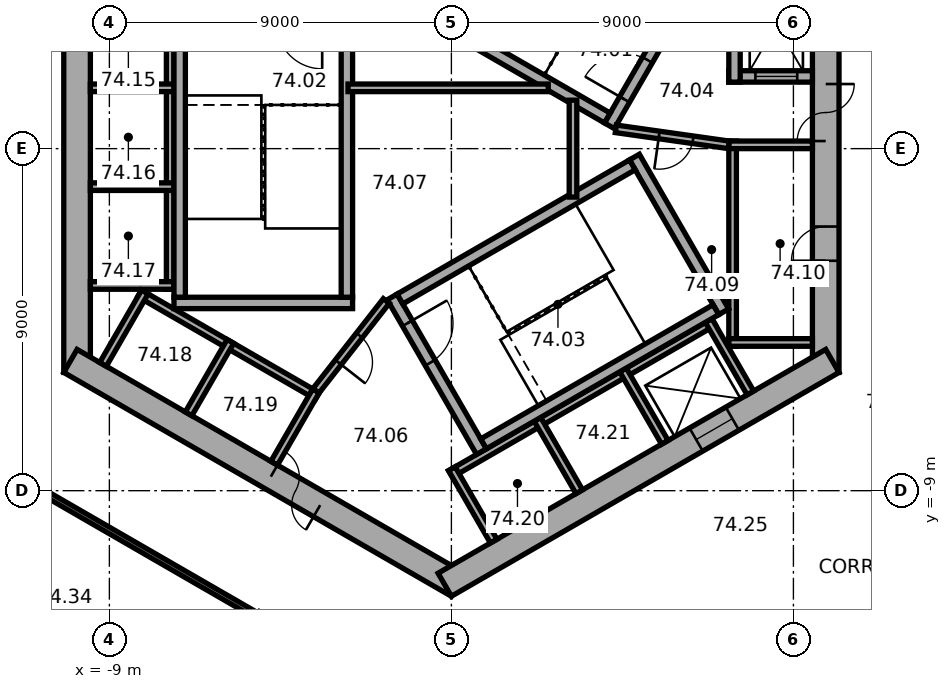
"""IFC4 building model, lengths in metres.
Left out: names, types, materials, properties, quantities, classifications, styles, units other than length and angle.
Written with IfcOpenShell. Run it as: python <this file> out.ifc"""

import sys

from ifc_helpers import new_model, si_unit, direction, frame, frame_2d, origin, place, context, subcontext, project, spatial, rectangle, extrude, element, fill, save


model = new_model("IFC4")
c1 = context("Model", 3, precision=1e-05, world=origin(), true_north=direction((0.0, 1.0)))
c2 = subcontext(c1, "Body", "Model", "MODEL_VIEW")
j1 = project(units=[si_unit("LENGTHUNIT", "METRE"), si_unit("PLANEANGLEUNIT", "RADIAN")], contexts=[c1])
p1 = place(None, origin())
s1 = spatial("IfcSite", under=j1, at=p1, CompositionType="ELEMENT")
p2 = place(p1, origin())
s2 = spatial("IfcBuilding", under=s1, at=p2, CompositionType="ELEMENT")
p3 = place(p2, frame((0.0, 0.0, 300.5)))
s3 = spatial("IfcBuildingStorey", under=s2, at=p3, CompositionType="ELEMENT", Elevation=300.5)
p4 = place(p3, frame((9.85, -5.889, 0.0), z_axis=(0.0, 0.0, 1.0), x_axis=(0.0, 1.0, 0.0)))
e1 = element("IfcWall", 1, at=p4, inside=s3, PredefinedType="SHEAR", context=c2, shape_type="SweptSolid", body=[
    extrude(rectangle(XDim=11.778, YDim=0.7, at=frame_2d((5.889, 0.0))), origin(), (0.0, 0.0, 1.0), 4.5),
])
p5 = place(p4, frame((6.089, 0.0, 0.0)))
e2 = element("IfcOpeningElement", 2, at=p5, cuts=e1, PredefinedType="OPENING", context=c2, shape_type="SweptSolid", body=[
    extrude(rectangle(XDim=1.5, YDim=2.1, at=frame_2d((0.75, 1.05))), frame((0.0, 0.36, 0.0), z_axis=(0.0, -1.0, 0.0), x_axis=(1.0, 0.0, 0.0)), (0.0, 0.0, 1.0), 0.72),
])
p6 = place(p4, frame((2.939, 0.0, 0.0)))
e3 = element("IfcOpeningElement", 3, at=p6, cuts=e1, PredefinedType="OPENING", context=c2, shape_type="SweptSolid", body=[
    extrude(rectangle(XDim=0.9, YDim=2.1, at=frame_2d((0.45, 1.05))), frame((0.0, 0.36, 0.0), z_axis=(0.0, -1.0, 0.0), x_axis=(1.0, 0.0, 0.0)), (0.0, 0.0, 1.0), 0.72),
])
p7 = place(p3, frame((-9.85, 5.889, 0.0), z_axis=(0.0, 0.0, 1.0), x_axis=(0.0, -1.0, 0.0)))
e4 = element("IfcWall", 4, at=p7, inside=s3, PredefinedType="SHEAR", context=c2, shape_type="SweptSolid", body=[
    extrude(rectangle(XDim=11.778, YDim=0.7, at=frame_2d((5.889, 0.0))), origin(), (0.0, 0.0, 1.0), 4.5),
])
p8 = place(p3, frame((-10.025, -5.586, 0.0), z_axis=(0.0, 0.0, 1.0), x_axis=(0.866026453023, -0.499998182661, 0.0)))
e5 = element("IfcWall", 5, at=p8, inside=s3, PredefinedType="SHEAR", context=c2, shape_type="SweptSolid", body=[
    extrude(rectangle(XDim=11.778, YDim=0.7, at=frame_2d((5.889, 0.0))), origin(), (0.0, 0.0, 1.0), 4.5),
])
p9 = place(p8, frame((6.089, 0.0, 0.0)))
e6 = element("IfcOpeningElement", 6, at=p9, cuts=e5, PredefinedType="OPENING", context=c2, shape_type="SweptSolid", body=[
    extrude(rectangle(XDim=1.5, YDim=2.1, at=frame_2d((0.75, 1.05))), frame((0.0, 0.36, 0.0), z_axis=(0.0, -1.0, 0.0), x_axis=(1.0, 0.0, 0.0)), (0.0, 0.0, 1.0), 0.72),
])
p10 = place(p3, frame((-0.175, -11.475, 0.0), z_axis=(0.0, 0.0, 1.0), x_axis=(0.866026453023, 0.499998182661, 0.0)))
e7 = element("IfcWall", 7, at=p10, inside=s3, PredefinedType="SHEAR", context=c2, shape_type="SweptSolid", body=[
    extrude(rectangle(XDim=11.778, YDim=0.7, at=frame_2d((5.889, 0.0))), origin(), (0.0, 0.0, 1.0), 4.5),
])
p11 = place(p10, frame((7.639, 0.0, 0.0)))
e8 = element("IfcOpeningElement", 8, at=p11, cuts=e7, PredefinedType="OPENING", context=c2, shape_type="SweptSolid", body=[
    extrude(rectangle(XDim=1.1, YDim=2.1, at=frame_2d((0.55, 1.05))), frame((0.0, 0.36, 0.0), z_axis=(0.0, -1.0, 0.0), x_axis=(1.0, 0.0, 0.0)), (0.0, 0.0, 1.0), 0.72),
])
p12 = place(p3, frame((2.58, -21.377, 0.0), z_axis=(0.0, 0.0, 1.0), x_axis=(0.833888592176, 0.551932800112, 0.0)))
e9 = element("IfcWall", 9, at=p12, inside=s3, PredefinedType="STANDARD", context=c2, shape_type="SweptSolid", body=[
    extrude(rectangle(XDim=17.731, YDim=0.2, at=frame_2d((8.866, 0.0))), origin(), (0.0, 0.0, 1.0), 4.5),
])
p13 = place(p3, frame((7.4, -5.2, 0.0), z_axis=(0.0, 0.0, 1.0), x_axis=(0.0, 1.0, 0.0)))
e10 = element("IfcWall", 10, at=p13, inside=s3, PredefinedType="PARTITIONING", context=c2, shape_type="SweptSolid", body=[
    extrude(rectangle(XDim=5.4, YDim=0.2, at=frame_2d((2.7, 0.0))), origin(), (0.0, 0.0, 1.0), 4.2),
])
for number, where, z_axis, x_axis in (
    (11, (7.3, -5.1, 0.0), (0.0, 0.0, 1.0), (1.0, 0.0, 0.0)),
    (12, (7.3, 0.1, 0.0), (0.0, 0.0, 1.0), (1.0, 0.0, 0.0)),
):
    element("IfcWall", number, at=place(p3, frame(where, z_axis=z_axis, x_axis=x_axis)), inside=s3, PredefinedType="PARTITIONING", context=c2, shape_type="SweptSolid", body=[
        extrude(rectangle(XDim=2.2, YDim=0.2, at=frame_2d((1.1, 0.0))), origin(), (0.0, 0.0, 1.0), 4.2),
    ])
p14 = place(p3, frame((-7.4, 4.3, 0.0), z_axis=(0.0, 0.0, 1.0), x_axis=(0.0, -1.0, 0.0)))
e13 = element("IfcWall", 13, at=p14, inside=s3, PredefinedType="PARTITIONING", context=c2, shape_type="SweptSolid", body=[
    extrude(rectangle(XDim=8.0, YDim=0.2, at=frame_2d((4.0, 0.0))), origin(), (0.0, 0.0, 1.0), 4.2),
])
for number, where, z_axis, x_axis in (
    (14, (-7.3, 1.6, 0.0), (0.0, 0.0, 1.0), (-1.0, 0.0, 0.0)),
    (15, (-7.3, -1.0, 0.0), (0.0, 0.0, 1.0), (-1.0, 0.0, 0.0)),
    (16, (-7.3, -3.6, 0.0), (0.0, 0.0, 1.0), (-1.0, 0.0, 0.0)),
):
    element("IfcWall", number, at=place(p3, frame(where, z_axis=z_axis, x_axis=x_axis)), inside=s3, PredefinedType="PARTITIONING", context=c2, shape_type="SweptSolid", body=[
        extrude(rectangle(XDim=2.2, YDim=0.2, at=frame_2d((1.1, 0.0))), origin(), (0.0, 0.0, 1.0), 4.2),
    ])
p15 = place(p3, frame((-8.203, -3.809, 0.0), z_axis=(0.0, 0.0, 1.0), x_axis=(0.866028230842, -0.499995103361, 0.0)))
e17 = element("IfcWall", 17, at=p15, inside=s3, PredefinedType="PARTITIONING", context=c2, shape_type="SweptSolid", body=[
    extrude(rectangle(XDim=5.4, YDim=0.2, at=frame_2d((2.7, 0.0))), origin(), (0.0, 0.0, 1.0), 4.2),
])
for number, where, z_axis, x_axis in (
    (18, (-8.067, -3.772, 0.0), (0.0, 0.0, 1.0), (-0.5, -0.866, 0.0)),
    (19, (-5.815, -5.072, 0.0), (0.0, 0.0, 1.0), (-0.5, -0.866, 0.0)),
):
    element("IfcWall", number, at=place(p3, frame(where, z_axis=z_axis, x_axis=x_axis)), inside=s3, PredefinedType="PARTITIONING", context=c2, shape_type="SweptSolid", body=[
        extrude(rectangle(XDim=2.2, YDim=0.2, at=frame_2d((1.1, 0.0))), origin(), (0.0, 0.0, 1.0), 4.2),
    ])
p16 = place(p3, frame((-3.563, -6.372, 0.0), z_axis=(0.0, 0.0, 1.0), x_axis=(-0.499994660107, -0.866028486751, 0.0)))
e20 = element("IfcWall", 20, at=p16, inside=s3, PredefinedType="PARTITIONING", context=c2, shape_type="SweptSolid", body=[
    extrude(rectangle(XDim=2.2, YDim=0.2, at=frame_2d((1.1, 0.0))), origin(), (0.0, 0.0, 1.0), 4.2),
])
p17 = place(p3, frame((-0.024, -8.559, 0.0), z_axis=(0.0, 0.0, 1.0), x_axis=(0.866026010844, 0.49999894854, 0.0)))
e21 = element("IfcWall", 21, at=p17, inside=s3, PredefinedType="PARTITIONING", context=c2, shape_type="SweptSolid", body=[
    extrude(rectangle(XDim=8.0, YDim=0.2, at=frame_2d((4.0, 0.0))), origin(), (0.0, 0.0, 1.0), 4.2),
])
for number, where, z_axis, x_axis in (
    (22, (0.013, -8.422, 0.0), (0.0, 0.0, 1.0), (0.5, -0.866, 0.0)),
    (23, (2.264, -7.122, 0.0), (0.0, 0.0, 1.0), (0.5, -0.866, 0.0)),
    (24, (4.516, -5.822, 0.0), (0.0, 0.0, 1.0), (0.5, -0.866, 0.0)),
    (25, (6.768, -4.522, 0.0), (0.0, 0.0, 1.0), (0.5, -0.866, 0.0)),
):
    element("IfcWall", number, at=place(p3, frame(where, z_axis=z_axis, x_axis=x_axis)), inside=s3, PredefinedType="PARTITIONING", context=c2, shape_type="SweptSolid", body=[
        extrude(rectangle(XDim=2.2, YDim=0.2, at=frame_2d((1.1, 0.0))), origin(), (0.0, 0.0, 1.0), 4.2),
    ])
p18 = place(p3, frame((4.158, 0.602, 0.0), z_axis=(0.0, 0.0, 1.0), x_axis=(0.499977259774, 0.866038532462, 0.0)))
e26 = element("IfcWall", 26, at=p18, inside=s3, PredefinedType="SHEAR", context=c2, shape_type="SweptSolid", body=[
    extrude(rectangle(XDim=4.7, YDim=0.3, at=frame_2d((2.35, 0.0))), origin(), (0.0, 0.0, 1.0), 4.5),
])
p19 = place(p18, frame((0.8, 0.0, 0.0)))
e27 = element("IfcOpeningElement", 27, at=p19, cuts=e26, PredefinedType="OPENING", context=c2, shape_type="SweptSolid", body=[
    extrude(rectangle(XDim=1.2, YDim=2.1, at=frame_2d((0.6, 1.05))), frame((0.0, 0.16, 0.0), z_axis=(0.0, -1.0, 0.0), x_axis=(1.0, 0.0, 0.0)), (0.0, 0.0, 1.0), 0.32),
])
p20 = place(p3, frame((4.103, 0.807, 0.0), z_axis=(0.0, 0.0, 1.0), x_axis=(-0.866027801685, 0.499995846692, 0.0)))
e28 = element("IfcWall", 28, at=p20, inside=s3, PredefinedType="SHEAR", context=c2, shape_type="SweptSolid", body=[
    extrude(rectangle(XDim=7.06, YDim=0.3, at=frame_2d((3.53, 0.0))), origin(), (0.0, 0.0, 1.0), 4.5),
])
p21 = place(p3, frame((-2.6, -4.06, 0.0), z_axis=(0.0, 0.0, 1.0), x_axis=(-1.0, 0.0, 0.0)))
e29 = element("IfcWall", 29, at=p21, inside=s3, PredefinedType="SHEAR", context=c2, shape_type="SweptSolid", body=[
    extrude(rectangle(XDim=4.7, YDim=0.3, at=frame_2d((2.35, 0.0))), origin(), (0.0, 0.0, 1.0), 4.5),
])
for number, where, z_axis, x_axis in (
    (30, (-2.75, 3.15, 0.0), (0.0, 0.0, 1.0), (0.0, -1.0, 0.0)),
    (31, (-7.15, 3.15, 0.0), (0.0, 0.0, 1.0), (0.0, -1.0, 0.0)),
):
    element("IfcWall", number, at=place(p3, frame(where, z_axis=z_axis, x_axis=x_axis)), inside=s3, PredefinedType="SHEAR", context=c2, shape_type="SweptSolid", body=[
        extrude(rectangle(XDim=7.06, YDim=0.3, at=frame_2d((3.53, 0.0))), origin(), (0.0, 0.0, 1.0), 4.5),
    ])
p22 = place(p3, frame((-1.558, -3.902, 0.0), z_axis=(0.0, 0.0, 1.0), x_axis=(0.499977259774, -0.866038532462, 0.0)))
e32 = element("IfcWall", 32, at=p22, inside=s3, PredefinedType="SHEAR", context=c2, shape_type="SweptSolid", body=[
    extrude(rectangle(XDim=4.7, YDim=0.3, at=frame_2d((2.35, 0.0))), origin(), (0.0, 0.0, 1.0), 4.5),
])
p23 = place(p22, frame((0.8, 0.0, 0.0)))
e33 = element("IfcOpeningElement", 33, at=p23, cuts=e32, PredefinedType="OPENING", context=c2, shape_type="SweptSolid", body=[
    extrude(rectangle(XDim=1.2, YDim=2.1, at=frame_2d((0.6, 1.05))), frame((0.0, 0.16, 0.0), z_axis=(0.0, -1.0, 0.0), x_axis=(1.0, 0.0, 0.0)), (0.0, 0.0, 1.0), 0.32),
])
p24 = place(p3, frame((4.816, -0.222, 0.0), z_axis=(0.0, 0.0, 1.0), x_axis=(0.499977259774, -0.866038532462, 0.0)))
e34 = element("IfcWall", 34, at=p24, inside=s3, PredefinedType="SHEAR", context=c2, shape_type="SweptSolid", body=[
    extrude(rectangle(XDim=4.7, YDim=0.3, at=frame_2d((2.35, 0.0))), origin(), (0.0, 0.0, 1.0), 4.5),
])
for number, where, z_axis, x_axis in (
    (35, (-1.353, -3.957, 0.0), (0.0, 0.0, 1.0), (0.866, 0.5, 0.0)),
    (36, (0.847, -7.767, 0.0), (0.0, 0.0, 1.0), (0.866, 0.5, 0.0)),
):
    element("IfcWall", number, at=place(p3, frame(where, z_axis=z_axis, x_axis=x_axis)), inside=s3, PredefinedType="SHEAR", context=c2, shape_type="SweptSolid", body=[
        extrude(rectangle(XDim=7.06, YDim=0.3, at=frame_2d((3.53, 0.0))), origin(), (0.0, 0.0, 1.0), 4.5),
    ])
p25 = place(p3, frame((7.3, 1.9, 0.0), z_axis=(0.0, 0.0, 1.0), x_axis=(1.0, 0.0, 0.0)))
e37 = element("IfcWall", 37, at=p25, inside=s3, PredefinedType="SHEAR", context=c2, shape_type="SweptSolid", body=[
    extrude(rectangle(XDim=2.2, YDim=0.3, at=frame_2d((1.1, 0.0))), origin(), (0.0, 0.0, 1.0), 4.2),
])
p26 = place(p25, frame((0.7, 0.0, 0.0)))
e38 = element("IfcOpeningElement", 38, at=p26, cuts=e37, PredefinedType="OPENING", context=c2, shape_type="SweptSolid", body=[
    extrude(rectangle(XDim=1.1, YDim=2.1, at=frame_2d((0.55, 1.05))), frame((0.0, 0.16, 0.0), z_axis=(0.0, -1.0, 0.0), x_axis=(1.0, 0.0, 0.0)), (0.0, 0.0, 1.0), 0.32),
])
p27 = place(p3, frame((7.45, 1.75, 0.0), z_axis=(0.0, 0.0, 1.0), x_axis=(0.0, 1.0, 0.0)))
e39 = element("IfcWall", 39, at=p27, inside=s3, PredefinedType="SHEAR", context=c2, shape_type="SweptSolid", body=[
    extrude(rectangle(XDim=3.35, YDim=0.3, at=frame_2d((1.675, 0.0))), origin(), (0.0, 0.0, 1.0), 4.2),
])
p28 = place(p3, frame((4.327, 0.521, 0.0), z_axis=(0.0, 0.0, 1.0), x_axis=(0.990124376366, -0.14019172346, 0.0)))
e40 = element("IfcWall", 40, at=p28, inside=s3, PredefinedType="PARTITIONING", context=c2, shape_type="SweptSolid", body=[
    extrude(rectangle(XDim=3.002, YDim=0.2, at=frame_2d((1.501, 0.0))), origin(), (0.0, 0.0, 1.0), 4.2),
])
p29 = place(p28, frame((1.15, 0.0, 0.0)))
e41 = element("IfcOpeningElement", 41, at=p29, cuts=e40, PredefinedType="OPENING", context=c2, shape_type="SweptSolid", body=[
    extrude(rectangle(XDim=0.9, YDim=2.1, at=frame_2d((0.45, 1.05))), frame((0.0, 0.11, 0.0), z_axis=(0.0, -1.0, 0.0), x_axis=(1.0, 0.0, 0.0)), (0.0, 0.0, 1.0), 0.22),
])
p30 = place(p3, frame((-1.712, -4.008, 0.0), z_axis=(0.0, 0.0, 1.0), x_axis=(-0.616549420702, -0.787316208287, 0.0)))
e42 = element("IfcWall", 42, at=p30, inside=s3, PredefinedType="PARTITIONING", context=c2, shape_type="SweptSolid", body=[
    extrude(rectangle(XDim=3.002, YDim=0.2, at=frame_2d((1.501, 0.0))), origin(), (0.0, 0.0, 1.0), 4.2),
])
p31 = place(p30, frame((1.15, 0.0, 0.0)))
e43 = element("IfcOpeningElement", 43, at=p31, cuts=e42, PredefinedType="OPENING", context=c2, shape_type="SweptSolid", body=[
    extrude(rectangle(XDim=0.9, YDim=2.1, at=frame_2d((0.45, 1.05))), frame((0.0, 0.11, 0.0), z_axis=(0.0, -1.0, 0.0), x_axis=(1.0, 0.0, 0.0)), (0.0, 0.0, 1.0), 0.22),
])
p32 = place(p3, frame((-2.72, 1.6, 0.0), z_axis=(0.0, 0.0, 1.0), x_axis=(1.0, 0.0, 0.0)))
e44 = element("IfcWall", 44, at=p32, inside=s3, PredefinedType="PARTITIONING", context=c2, shape_type="SweptSolid", body=[
    extrude(rectangle(XDim=5.269, YDim=0.2, at=frame_2d((2.634, 0.0))), origin(), (0.0, 0.0, 1.0), 4.2),
])
p33 = place(p3, frame((3.2, -1.275, 0.0), z_axis=(0.0, 0.0, 1.0), x_axis=(0.0, 1.0, 0.0)))
e45 = element("IfcWall", 45, at=p33, inside=s3, PredefinedType="PARTITIONING", context=c2, shape_type="SweptSolid", body=[
    extrude(rectangle(XDim=2.549, YDim=0.2, at=frame_2d((1.275, 0.0))), origin(), (0.0, 0.0, 1.0), 4.2),
])
p34 = place(p3, frame((-6.936, -16.318, 0.0), z_axis=(0.0, 0.0, 1.0), x_axis=(-0.866026615439, 0.499997901347, 0.0)))
e46 = element("IfcWall", 46, at=p34, inside=s3, PredefinedType="PARTITIONING", context=c2, shape_type="SweptSolid", body=[
    extrude(rectangle(XDim=9.846, YDim=0.15, at=frame_2d((4.923, 0.0))), origin(), (0.0, 0.0, 1.0), 4.2),
])
p35 = place(p3, frame((16.13, -10.429, 0.0), z_axis=(0.0, 0.0, 1.0), x_axis=(-0.833865754552, -0.551967302822, 0.0)))
e47 = element("IfcWall", 47, at=p35, inside=s3, PredefinedType="PARTITIONING", context=c2, shape_type="SweptSolid", body=[
    extrude(rectangle(XDim=13.105, YDim=0.15, at=frame_2d((6.553, 0.0))), origin(), (0.0, 0.0, 1.0), 4.2),
])
p36 = place(p3, frame((-13.148, -7.651, 0.0), z_axis=(0.0, 0.0, 1.0), x_axis=(0.866016920268, -0.500014693593, 0.0)))
e48 = element("IfcWall", 48, at=p36, inside=s3, PredefinedType="PARTITIONING", context=c2, shape_type="SweptSolid", body=[
    extrude(rectangle(XDim=9.16, YDim=0.15, at=frame_2d((4.58, 0.0))), origin(), (0.0, 0.0, 1.0), 4.2),
])
p37 = place(p36, frame((0.55, 0.0, 0.0)))
e49 = element("IfcOpeningElement", 49, at=p37, cuts=e48, PredefinedType="OPENING", context=c2, shape_type="SweptSolid", body=[
    extrude(rectangle(XDim=1.0, YDim=2.1, at=frame_2d((0.5, 1.05))), frame((0.0, 0.085, 0.0), z_axis=(0.0, -1.0, 0.0), x_axis=(1.0, 0.0, 0.0)), (0.0, 0.0, 1.0), 0.17),
])
p38 = place(p5, origin())
e50 = element("IfcDoor", 50, at=p38, inside=s3, OperationType="DOUBLE_DOOR_SINGLE_SWING", PredefinedType="DOOR", context=c2, shape_type="SweptSolid", body=[
    extrude(rectangle(XDim=1.5, YDim=2.1, at=frame_2d((0.75, 1.05))), frame((0.0, 0.025, 0.0), z_axis=(0.0, -1.0, 0.0), x_axis=(1.0, 0.0, 0.0)), (0.0, 0.0, 1.0), 0.05),
])
fill(e2, e50)
p39 = place(p9, origin())
e51 = element("IfcDoor", 51, at=p39, inside=s3, OperationType="DOUBLE_DOOR_SINGLE_SWING", PredefinedType="DOOR", context=c2, shape_type="SweptSolid", body=[
    extrude(rectangle(XDim=1.5, YDim=2.1, at=frame_2d((0.75, 1.05))), frame((0.0, 0.025, 0.0), z_axis=(0.0, -1.0, 0.0), x_axis=(1.0, 0.0, 0.0)), (0.0, 0.0, 1.0), 0.05),
])
fill(e6, e51)
p40 = place(p19, origin())
e52 = element("IfcDoor", 52, at=p40, inside=s3, OperationType="SINGLE_SWING_RIGHT", PredefinedType="DOOR", context=c2, shape_type="SweptSolid", body=[
    extrude(rectangle(XDim=1.2, YDim=2.1, at=frame_2d((0.6, 1.05))), frame((0.0, 0.025, 0.0), z_axis=(0.0, -1.0, 0.0), x_axis=(1.0, 0.0, 0.0)), (0.0, 0.0, 1.0), 0.05),
])
fill(e27, e52)
p41 = place(p23, origin())
e53 = element("IfcDoor", 53, at=p41, inside=s3, OperationType="SINGLE_SWING_RIGHT", PredefinedType="DOOR", context=c2, shape_type="SweptSolid", body=[
    extrude(rectangle(XDim=1.2, YDim=2.1, at=frame_2d((0.6, 1.05))), frame((0.0, 0.025, 0.0), z_axis=(0.0, -1.0, 0.0), x_axis=(1.0, 0.0, 0.0)), (0.0, 0.0, 1.0), 0.05),
])
fill(e33, e53)
p42 = place(p29, origin())
e54 = element("IfcDoor", 54, at=p42, inside=s3, OperationType="SINGLE_SWING_LEFT", PredefinedType="DOOR", context=c2, shape_type="SweptSolid", body=[
    extrude(rectangle(XDim=0.9, YDim=2.1, at=frame_2d((0.45, 1.05))), frame((0.0, 0.025, 0.0), z_axis=(0.0, -1.0, 0.0), x_axis=(1.0, 0.0, 0.0)), (0.0, 0.0, 1.0), 0.05),
])
fill(e41, e54)
p43 = place(p31, origin())
e55 = element("IfcDoor", 55, at=p43, inside=s3, OperationType="SINGLE_SWING_LEFT", PredefinedType="DOOR", context=c2, shape_type="SweptSolid", body=[
    extrude(rectangle(XDim=0.9, YDim=2.1, at=frame_2d((0.45, 1.05))), frame((0.0, 0.025, 0.0), z_axis=(0.0, -1.0, 0.0), x_axis=(1.0, 0.0, 0.0)), (0.0, 0.0, 1.0), 0.05),
])
fill(e43, e55)
p44 = place(p6, origin())
e56 = element("IfcDoor", 56, at=p44, inside=s3, OperationType="SINGLE_SWING_LEFT", PredefinedType="DOOR", context=c2, shape_type="SweptSolid", body=[
    extrude(rectangle(XDim=0.9, YDim=2.1, at=frame_2d((0.45, 1.05))), frame((0.0, 0.025, 0.0), z_axis=(0.0, -1.0, 0.0), x_axis=(1.0, 0.0, 0.0)), (0.0, 0.0, 1.0), 0.05),
])
fill(e3, e56)
p45 = place(p26, origin())
e57 = element("IfcDoor", 57, at=p45, inside=s3, OperationType="DOUBLE_DOOR_SLIDING", PredefinedType="DOOR", context=c2, shape_type="SweptSolid", body=[
    extrude(rectangle(XDim=1.1, YDim=2.1, at=frame_2d((0.55, 1.05))), frame((0.0, 0.025, 0.0), z_axis=(0.0, -1.0, 0.0), x_axis=(1.0, 0.0, 0.0)), (0.0, 0.0, 1.0), 0.05),
])
fill(e38, e57)
p46 = place(p11, origin())
e58 = element("IfcDoor", 58, at=p46, inside=s3, OperationType="DOUBLE_DOOR_SLIDING", PredefinedType="DOOR", context=c2, shape_type="SweptSolid", body=[
    extrude(rectangle(XDim=1.1, YDim=2.1, at=frame_2d((0.55, 1.05))), frame((0.0, 0.025, 0.0), z_axis=(0.0, -1.0, 0.0), x_axis=(1.0, 0.0, 0.0)), (0.0, 0.0, 1.0), 0.05),
])
fill(e8, e58)
save(model, sys.argv[1])
